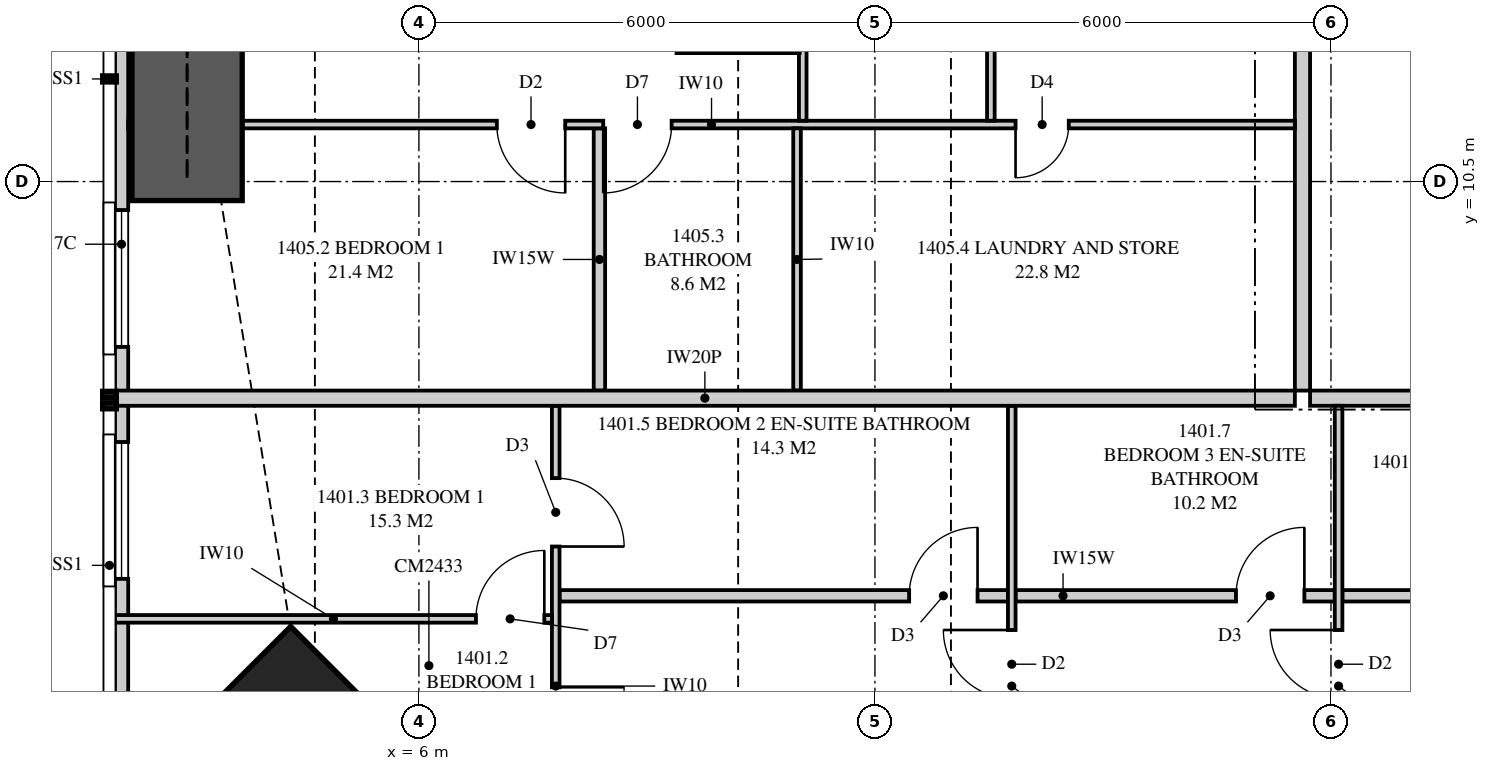
"""IFC4 building model, lengths in metres.
Left out: names, types, materials, properties, quantities, classifications, styles, units other than length and angle.
Written with IfcOpenShell. Run it as: python <this file> out.ifc"""

import sys

from ifc_helpers import new_model, si_unit, direction, frame, frame_2d, origin, origin_2d, place, context, subcontext, project, spatial, polyline, rectangle, outline, extrude, element, fill, save


model = new_model("IFC4")
c1 = context("Model", 3, precision=1e-05, world=origin(), true_north=direction((0.0, 1.0)))
c2 = subcontext(c1, "Body", "Model", "MODEL_VIEW")
j1 = project(units=[si_unit("LENGTHUNIT", "METRE"), si_unit("PLANEANGLEUNIT", "RADIAN")], contexts=[c1])
p1 = place(None, origin())
s1 = spatial("IfcSite", under=j1, at=p1, CompositionType="ELEMENT")
p2 = place(p1, origin())
s2 = spatial("IfcBuilding", under=s1, at=p2, CompositionType="ELEMENT")
p3 = place(p2, frame((0.0, 0.0, 54.5)))
s3 = spatial("IfcBuildingStorey", under=s2, at=p3, CompositionType="ELEMENT", Elevation=54.5)
p4 = place(p3, frame((4.631, 2.631, 0.0), z_axis=(0.0, 0.0, 1.0), x_axis=(0.707106781187, 0.707106781187, 0.0)))
e1 = element("IfcColumn", 1, at=p4, inside=s3, PredefinedType="COLUMN", context=c2, shape_type="SweptSolid", body=[
    extrude(rectangle(XDim=2.4, YDim=3.3, at=origin_2d()), origin(), (0.0, 0.0, 1.0), 3.35),
])
p5 = place(p3, frame((2.087, 16.3, 0.0), z_axis=(0.0, 0.0, 1.0), x_axis=(0.0, -1.0, 0.0)))
e2 = element("IfcWall", 2, at=p5, inside=s3, PredefinedType="SOLIDWALL", context=c2, shape_type="SweptSolid", body=[
    extrude(outline(polyline([(0.0, 0.0), (13.249, 0.0), (13.249, 3.11), (3.519, 3.11), (3.519, 2.15), (3.426, 2.15), (3.426, 3.11), (3.3, 3.11), (3.3, 2.15), (0.0, 2.15), (0.0, 0.0)])), frame((0.0, 0.087, 0.0), z_axis=(0.0, -1.0, 0.0), x_axis=(1.0, 0.0, 0.0)), (0.0, 0.0, 1.0), 0.175),
])
p6 = place(p5, frame((6.175, 0.0, 0.4)))
e3 = element("IfcOpeningElement", 3, at=p6, cuts=e2, PredefinedType="OPENING", context=c2, shape_type="SweptSolid", body=[
    extrude(rectangle(XDim=1.8, YDim=1.7, at=frame_2d((0.9, 0.85))), frame((0.0, 0.097, 0.0), z_axis=(0.0, -1.0, 0.0), x_axis=(1.0, 0.0, 0.0)), (0.0, 0.0, 1.0), 0.195),
])
p7 = place(p5, frame((9.227, 0.0, 0.4)))
e4 = element("IfcOpeningElement", 4, at=p7, cuts=e2, PredefinedType="OPENING", context=c2, shape_type="SweptSolid", body=[
    extrude(rectangle(XDim=1.8, YDim=1.7, at=frame_2d((0.9, 0.85))), frame((0.0, 0.097, 0.0), z_axis=(0.0, -1.0, 0.0), x_axis=(1.0, 0.0, 0.0)), (0.0, 0.0, 1.0), 0.195),
])
p8 = place(p3, frame((17.725, 7.65, 0.0), z_axis=(0.0, 0.0, 1.0), x_axis=(1.0, 0.0, 0.0)))
e5 = element("IfcWall", 5, at=p8, inside=s3, PredefinedType="PARTITIONING", context=c2, shape_type="SweptSolid", body=[
    extrude(rectangle(XDim=3.525, YDim=0.2, at=frame_2d((1.762, 0.0))), origin(), (0.0, 0.0, 1.0), 3.11),
])
p9 = place(p3, frame((7.8, 0.175, 0.0), z_axis=(0.0, 0.0, 1.0), x_axis=(0.0, 1.0, 0.0)))
e6 = element("IfcWall", 6, at=p9, inside=s3, PredefinedType="PARTITIONING", context=c2, shape_type="SweptSolid", body=[
    extrude(outline(polyline([(0.0, 0.0), (7.375, 0.0), (7.375, 3.11), (2.697, 3.11), (2.697, 2.15), (0.943, 2.15), (0.943, 3.11), (0.0, 3.11), (0.0, 0.0)])), frame((0.0, 0.05, 0.0), z_axis=(0.0, -1.0, 0.0), x_axis=(1.0, 0.0, 0.0)), (0.0, 0.0, 1.0), 0.1),
])
p10 = place(p9, frame((2.772, 0.0, 0.0)))
e7 = element("IfcOpeningElement", 7, at=p10, cuts=e6, PredefinedType="OPENING", context=c2, shape_type="SweptSolid", body=[
    extrude(rectangle(XDim=0.9, YDim=2.1, at=frame_2d((0.45, 1.05))), frame((0.0, 0.06, 0.0), z_axis=(0.0, -1.0, 0.0), x_axis=(1.0, 0.0, 0.0)), (0.0, 0.0, 1.0), 0.12),
])
p11 = place(p9, frame((5.523, 0.0, 0.0)))
e8 = element("IfcOpeningElement", 8, at=p11, cuts=e6, PredefinedType="OPENING", context=c2, shape_type="SweptSolid", body=[
    extrude(rectangle(XDim=0.9, YDim=2.1, at=frame_2d((0.45, 1.05))), frame((0.0, 0.06, 0.0), z_axis=(0.0, -1.0, 0.0), x_axis=(1.0, 0.0, 0.0)), (0.0, 0.0, 1.0), 0.12),
])
p12 = place(p3, frame((13.8, 0.175, 0.0), z_axis=(0.0, 0.0, 1.0), x_axis=(0.0, 1.0, 0.0)))
e9 = element("IfcWall", 9, at=p12, inside=s3, PredefinedType="PARTITIONING", context=c2, shape_type="SweptSolid", body=[
    extrude(outline(polyline([(1.635, 2.15), (0.0, 2.15), (0.0, 0.0), (7.375, 0.0), (7.375, 3.11), (1.635, 3.11), (1.635, 2.15)]), holes=[polyline([(1.021, 0.133), (0.529, 0.133), (0.529, 0.923), (1.021, 0.923), (1.021, 0.133)]), polyline([(1.021, 1.227), (0.529, 1.227), (0.529, 2.017), (1.021, 2.017), (1.021, 1.227)])]), frame((0.0, 0.05, 0.0), z_axis=(0.0, -1.0, 0.0), x_axis=(1.0, 0.0, 0.0)), (0.0, 0.0, 1.0), 0.1),
])
p13 = place(p12, frame((3.525, 0.0, 0.0)))
e10 = element("IfcOpeningElement", 10, at=p13, cuts=e9, PredefinedType="OPENING", context=c2, shape_type="SweptSolid", body=[
    extrude(rectangle(XDim=0.9, YDim=2.1, at=frame_2d((0.45, 1.05))), frame((0.0, 0.06, 0.0), z_axis=(0.0, -1.0, 0.0), x_axis=(1.0, 0.0, 0.0)), (0.0, 0.0, 1.0), 0.12),
])
p14 = place(p3, frame((18.1, 0.175, 0.0), z_axis=(0.0, 0.0, 1.0), x_axis=(0.0, 1.0, 0.0)))
e11 = element("IfcWall", 11, at=p14, inside=s3, PredefinedType="PARTITIONING", context=c2, shape_type="SweptSolid", body=[
    extrude(outline(polyline([(0.0, 0.0), (7.375, 0.0), (7.375, 3.11), (1.635, 3.11), (1.635, 2.15), (0.0, 2.15), (0.0, 3.11), (0.0, 0.0)])), frame((0.0, 0.05, 0.0), z_axis=(0.0, -1.0, 0.0), x_axis=(1.0, 0.0, 0.0)), (0.0, 0.0, 1.0), 0.1),
])
p15 = place(p14, frame((3.525, 0.0, 0.0)))
e12 = element("IfcOpeningElement", 12, at=p15, cuts=e11, PredefinedType="OPENING", context=c2, shape_type="SweptSolid", body=[
    extrude(rectangle(XDim=0.9, YDim=2.1, at=frame_2d((0.45, 1.05))), frame((0.0, 0.06, 0.0), z_axis=(0.0, -1.0, 0.0), x_axis=(1.0, 0.0, 0.0)), (0.0, 0.0, 1.0), 0.12),
])
p16 = place(p3, frame((2.0, 4.747, 0.0), z_axis=(0.0, 0.0, 1.0), x_axis=(1.0, 0.0, 0.0)))
e13 = element("IfcWall", 13, at=p16, inside=s3, PredefinedType="PARTITIONING", context=c2, shape_type="SweptSolid", body=[
    extrude(outline(polyline([(0.0, 0.0), (5.75, 0.0), (5.75, 3.11), (3.16, 3.11), (3.16, 2.15), (1.417, 2.15), (1.417, 3.11), (0.0, 3.11), (0.0, 0.0)])), frame((0.0, 0.05, 0.0), z_axis=(0.0, -1.0, 0.0), x_axis=(1.0, 0.0, 0.0)), (0.0, 0.0, 1.0), 0.1),
])
p17 = place(p16, frame((4.75, 0.0, 0.0)))
e14 = element("IfcOpeningElement", 14, at=p17, cuts=e13, PredefinedType="OPENING", context=c2, shape_type="SweptSolid", body=[
    extrude(rectangle(XDim=0.9, YDim=2.1, at=frame_2d((0.45, 1.05))), frame((0.0, 0.06, 0.0), z_axis=(0.0, -1.0, 0.0), x_axis=(1.0, 0.0, 0.0)), (0.0, 0.0, 1.0), 0.12),
])
p18 = place(p3, frame((7.85, 5.05, 0.0), z_axis=(0.0, 0.0, 1.0), x_axis=(1.0, 0.0, 0.0)))
e15 = element("IfcWall", 15, at=p18, inside=s3, PredefinedType="PLUMBINGWALL", context=c2, shape_type="SweptSolid", body=[
    extrude(outline(polyline([(0.0, 0.0), (5.9, 0.0), (5.9, 3.11), (5.462, 3.11), (5.462, 2.541), (4.838, 2.541), (4.838, 3.11), (3.635, 3.11), (3.635, 2.51), (1.065, 2.51), (1.065, 3.11), (0.0, 3.11), (0.0, 0.0)])), frame((0.0, 0.075, 0.0), z_axis=(0.0, -1.0, 0.0), x_axis=(1.0, 0.0, 0.0)), (0.0, 0.0, 1.0), 0.15),
])
p19 = place(p18, frame((4.6, 0.0, 0.0)))
e16 = element("IfcOpeningElement", 16, at=p19, cuts=e15, PredefinedType="OPENING", context=c2, shape_type="SweptSolid", body=[
    extrude(rectangle(XDim=0.9, YDim=2.1, at=frame_2d((0.45, 1.05))), frame((0.0, 0.085, 0.0), z_axis=(0.0, -1.0, 0.0), x_axis=(1.0, 0.0, 0.0)), (0.0, 0.0, 1.0), 0.17),
])
p20 = place(p3, frame((13.85, 5.05, 0.0), z_axis=(0.0, 0.0, 1.0), x_axis=(1.0, 0.0, 0.0)))
e17 = element("IfcWall", 17, at=p20, inside=s3, PredefinedType="PLUMBINGWALL", context=c2, shape_type="SweptSolid", body=[
    extrude(rectangle(XDim=4.2, YDim=0.15, at=frame_2d((2.1, 0.0))), origin(), (0.0, 0.0, 1.0), 3.11),
])
p21 = place(p20, frame((2.9, 0.0, 0.0)))
e18 = element("IfcOpeningElement", 18, at=p21, cuts=e17, PredefinedType="OPENING", context=c2, shape_type="SweptSolid", body=[
    extrude(rectangle(XDim=0.9, YDim=2.1, at=frame_2d((0.45, 1.05))), frame((0.0, 0.085, 0.0), z_axis=(0.0, -1.0, 0.0), x_axis=(1.0, 0.0, 0.0)), (0.0, 0.0, 1.0), 0.17),
])
p22 = place(p3, frame((18.15, 5.05, 0.0), z_axis=(0.0, 0.0, 1.0), x_axis=(1.0, 0.0, 0.0)))
e19 = element("IfcWall", 19, at=p22, inside=s3, PredefinedType="PLUMBINGWALL", context=c2, shape_type="SweptSolid", body=[
    extrude(rectangle(XDim=2.95, YDim=0.15, at=frame_2d((1.475, 0.0))), origin(), (0.0, 0.0, 1.0), 3.11),
])
p23 = place(p3, frame((2.0, 7.65, 0.0), z_axis=(0.0, 0.0, 1.0), x_axis=(1.0, 0.0, 0.0)))
e20 = element("IfcWall", 20, at=p23, inside=s3, PredefinedType="PARTITIONING", context=c2, shape_type="SweptSolid", body=[
    extrude(outline(polyline([(0.0, 0.0), (15.525, 0.0), (15.525, 3.11), (11.337, 3.11), (11.337, 2.541), (10.663, 2.541), (10.663, 3.11), (9.51, 3.11), (9.51, 2.51), (6.89, 2.51), (6.89, 3.11), (2.969, 3.11), (2.969, 2.541), (2.74, 2.541), (2.74, 2.15), (0.896, 2.15), (0.896, 3.11), (0.0, 3.11), (0.0, 0.0)])), frame((0.0, 0.1, 0.0), z_axis=(0.0, -1.0, 0.0), x_axis=(1.0, 0.0, 0.0)), (0.0, 0.0, 1.0), 0.2),
])
p24 = place(p3, frame((17.625, 7.75, 0.0), z_axis=(0.0, 0.0, 1.0), x_axis=(0.0, 1.0, 0.0)))
e21 = element("IfcWall", 21, at=p24, inside=s3, PredefinedType="PARTITIONING", context=c2, shape_type="SweptSolid", body=[
    extrude(outline(polyline([(0.0, 0.0), (16.25, 0.0), (16.25, 3.11), (5.587, 3.11), (5.587, 2.541), (4.913, 2.541), (4.913, 3.11), (0.0, 3.11), (0.0, 0.0)])), frame((0.0, 0.1, 0.0), z_axis=(0.0, -1.0, 0.0), x_axis=(1.0, 0.0, 0.0)), (0.0, 0.0, 1.0), 0.2),
])
p25 = place(p24, frame((7.075, 0.0, 0.0)))
e22 = element("IfcOpeningElement", 22, at=p25, cuts=e21, PredefinedType="OPENING", context=c2, shape_type="SweptSolid", body=[
    extrude(rectangle(XDim=1.05, YDim=2.2, at=frame_2d((0.525, 1.1))), frame((0.0, 0.11, 0.0), z_axis=(0.0, -1.0, 0.0), x_axis=(1.0, 0.0, 0.0)), (0.0, 0.0, 1.0), 0.22),
])
p26 = place(p3, frame((2.175, 11.25, 0.0), z_axis=(0.0, 0.0, 1.0), x_axis=(1.0, 0.0, 0.0)))
e23 = element("IfcWall", 23, at=p26, inside=s3, PredefinedType="PARTITIONING", context=c2, shape_type="SweptSolid", body=[
    extrude(outline(polyline([(0.188, 3.11), (0.0, 3.11), (0.0, 0.0), (0.529, 0.0), (0.529, 0.273), (1.021, 0.273), (1.021, 0.0), (15.35, 0.0), (15.35, 3.11), (11.112, 3.11), (11.112, 2.541), (10.538, 2.541), (10.538, 3.11), (9.285, 3.11), (9.285, 2.51), (6.765, 2.51), (6.765, 3.11), (2.744, 3.11), (2.744, 2.541), (2.169, 2.541), (2.169, 3.11), (1.93, 3.11), (1.93, 2.15), (1.021, 2.15), (1.021, 1.876), (0.529, 1.876), (0.529, 2.15), (0.188, 2.15), (0.188, 3.11)])), frame((0.0, 0.05, 0.0), z_axis=(0.0, -1.0, 0.0), x_axis=(1.0, 0.0, 0.0)), (0.0, 0.0, 1.0), 0.1),
])
p27 = place(p26, frame((4.85, 0.0, 0.0)))
e24 = element("IfcOpeningElement", 24, at=p27, cuts=e23, PredefinedType="OPENING", context=c2, shape_type="SweptSolid", body=[
    extrude(rectangle(XDim=0.9, YDim=2.1, at=frame_2d((0.45, 1.05))), frame((0.0, 0.06, 0.0), z_axis=(0.0, -1.0, 0.0), x_axis=(1.0, 0.0, 0.0)), (0.0, 0.0, 1.0), 0.12),
])
p28 = place(p26, frame((6.25, 0.0, 0.0)))
e25 = element("IfcOpeningElement", 25, at=p28, cuts=e23, PredefinedType="OPENING", context=c2, shape_type="SweptSolid", body=[
    extrude(rectangle(XDim=0.9, YDim=2.1, at=frame_2d((0.45, 1.05))), frame((0.0, 0.06, 0.0), z_axis=(0.0, -1.0, 0.0), x_axis=(1.0, 0.0, 0.0)), (0.0, 0.0, 1.0), 0.12),
])
p29 = place(p26, frame((11.675, 0.0, 0.0)))
e26 = element("IfcOpeningElement", 26, at=p29, cuts=e23, PredefinedType="OPENING", context=c2, shape_type="SweptSolid", body=[
    extrude(rectangle(XDim=0.7, YDim=2.1, at=frame_2d((0.35, 1.05))), frame((0.0, 0.06, 0.0), z_axis=(0.0, -1.0, 0.0), x_axis=(1.0, 0.0, 0.0)), (0.0, 0.0, 1.0), 0.12),
])
p30 = place(p3, frame((8.375, 7.75, 0.0), z_axis=(0.0, 0.0, 1.0), x_axis=(0.0, 1.0, 0.0)))
e27 = element("IfcWall", 27, at=p30, inside=s3, PredefinedType="PLUMBINGWALL", context=c2, shape_type="SweptSolid", body=[
    extrude(rectangle(XDim=3.45, YDim=0.15, at=frame_2d((1.725, 0.0))), origin(), (0.0, 0.0, 1.0), 3.11),
])
p31 = place(p3, frame((10.975, 7.75, 0.0), z_axis=(0.0, 0.0, 1.0), x_axis=(0.0, 1.0, 0.0)))
e28 = element("IfcWall", 28, at=p31, inside=s3, PredefinedType="PARTITIONING", context=c2, shape_type="SweptSolid", body=[
    extrude(outline(polyline([(0.0, 0.0), (3.45, 0.0), (3.45, 3.11), (3.45, 2.51), (0.0, 2.51), (0.0, 3.11), (0.0, 0.0)])), frame((0.0, 0.05, 0.0), z_axis=(0.0, -1.0, 0.0), x_axis=(1.0, 0.0, 0.0)), (0.0, 0.0, 1.0), 0.1),
])
p32 = place(p3, frame((13.525, 11.3, 0.0), z_axis=(0.0, 0.0, 1.0), x_axis=(0.0, 1.0, 0.0)))
e29 = element("IfcWall", 29, at=p32, inside=s3, PredefinedType="PARTITIONING", context=c2, shape_type="SweptSolid", body=[
    extrude(outline(polyline([(0.0, 0.0), (8.05, 0.0), (8.05, 3.11), (1.987, 3.11), (1.987, 2.541), (1.413, 2.541), (1.413, 3.11), (0.0, 3.11), (0.0, 0.0)])), frame((0.0, 0.05, 0.0), z_axis=(0.0, -1.0, 0.0), x_axis=(1.0, 0.0, 0.0)), (0.0, 0.0, 1.0), 0.1),
])
p33 = place(p32, frame((3.525, 0.0, 0.0)))
e30 = element("IfcOpeningElement", 30, at=p33, cuts=e29, PredefinedType="OPENING", context=c2, shape_type="SweptSolid", body=[
    extrude(rectangle(XDim=1.0, YDim=2.1, at=frame_2d((0.5, 1.05))), frame((0.0, 0.06, 0.0), z_axis=(0.0, -1.0, 0.0), x_axis=(1.0, 0.0, 0.0)), (0.0, 0.0, 1.0), 0.12),
])
p34 = place(p3, frame((11.05, 11.3, 0.0), z_axis=(0.0, 0.0, 1.0), x_axis=(0.0, 1.0, 0.0)))
e31 = element("IfcWall", 31, at=p34, inside=s3, PredefinedType="PARTITIONING", context=c2, shape_type="SweptSolid", body=[
    extrude(rectangle(XDim=8.05, YDim=0.1, at=frame_2d((4.025, 0.0))), origin(), (0.0, 0.0, 1.0), 2.51),
])
p35 = place(p34, frame((3.525, 0.0, 0.0)))
e32 = element("IfcOpeningElement", 32, at=p35, cuts=e31, PredefinedType="OPENING", context=c2, shape_type="SweptSolid", body=[
    extrude(rectangle(XDim=1.0, YDim=2.1, at=frame_2d((0.5, 1.05))), frame((0.0, 0.06, 0.0), z_axis=(0.0, -1.0, 0.0), x_axis=(1.0, 0.0, 0.0)), (0.0, 0.0, 1.0), 0.12),
])
p36 = place(p3, frame((2.95, 10.25, 0.0), z_axis=(0.0, 0.0, 1.0), x_axis=(0.0, 1.0, 0.0)))
e33 = element("IfcWall", 33, at=p36, inside=s3, PredefinedType="SHEAR", context=c2, shape_type="SweptSolid", body=[
    extrude(rectangle(XDim=5.5, YDim=1.45, at=frame_2d((2.75, 0.0))), origin(), (0.0, 0.0, 1.0), 3.35),
])
p37 = place(p6, origin())
e34 = element("IfcWindow", 34, at=p37, inside=s3, PartitioningType="SINGLE_PANEL", PredefinedType="WINDOW", context=c2, shape_type="SweptSolid", body=[
    extrude(rectangle(XDim=1.8, YDim=1.7, at=frame_2d((0.9, 0.85))), frame((0.0, 0.03, 0.0), z_axis=(0.0, -1.0, 0.0), x_axis=(1.0, 0.0, 0.0)), (0.0, 0.0, 1.0), 0.06),
])
fill(e3, e34)
p38 = place(p7, origin())
e35 = element("IfcWindow", 35, at=p38, inside=s3, PartitioningType="SINGLE_PANEL", PredefinedType="WINDOW", context=c2, shape_type="SweptSolid", body=[
    extrude(rectangle(XDim=1.8, YDim=1.7, at=frame_2d((0.9, 0.85))), frame((0.0, 0.03, 0.0), z_axis=(0.0, -1.0, 0.0), x_axis=(1.0, 0.0, 0.0)), (0.0, 0.0, 1.0), 0.06),
])
fill(e4, e35)
p39 = place(p17, origin())
e36 = element("IfcDoor", 36, at=p39, inside=s3, OperationType="SINGLE_SWING_RIGHT", PredefinedType="DOOR", context=c2, shape_type="SweptSolid", body=[
    extrude(rectangle(XDim=0.9, YDim=2.1, at=frame_2d((0.45, 1.05))), frame((0.0, 0.025, 0.0), z_axis=(0.0, -1.0, 0.0), x_axis=(1.0, 0.0, 0.0)), (0.0, 0.0, 1.0), 0.05),
])
fill(e14, e36)
p40 = place(p10, frame((0.9, 0.0, 0.0), z_axis=(0.0, 0.0, 1.0), x_axis=(-1.0, 0.0, 0.0)))
e37 = element("IfcDoor", 37, at=p40, inside=s3, OperationType="SINGLE_SWING_LEFT", PredefinedType="DOOR", context=c2, shape_type="SweptSolid", body=[
    extrude(rectangle(XDim=0.9, YDim=2.1, at=frame_2d((0.45, 1.05))), frame((0.0, 0.025, 0.0), z_axis=(0.0, -1.0, 0.0), x_axis=(1.0, 0.0, 0.0)), (0.0, 0.0, 1.0), 0.05),
])
fill(e7, e37)
p41 = place(p13, origin())
e38 = element("IfcDoor", 38, at=p41, inside=s3, OperationType="SINGLE_SWING_RIGHT", PredefinedType="DOOR", context=c2, shape_type="SweptSolid", body=[
    extrude(rectangle(XDim=0.9, YDim=2.1, at=frame_2d((0.45, 1.05))), frame((0.0, 0.025, 0.0), z_axis=(0.0, -1.0, 0.0), x_axis=(1.0, 0.0, 0.0)), (0.0, 0.0, 1.0), 0.05),
])
fill(e10, e38)
p42 = place(p19, origin())
e39 = element("IfcDoor", 39, at=p42, inside=s3, OperationType="SINGLE_SWING_RIGHT", PredefinedType="DOOR", context=c2, shape_type="SweptSolid", body=[
    extrude(rectangle(XDim=0.9, YDim=2.1, at=frame_2d((0.45, 1.05))), frame((0.0, 0.025, 0.0), z_axis=(0.0, -1.0, 0.0), x_axis=(1.0, 0.0, 0.0)), (0.0, 0.0, 1.0), 0.05),
])
fill(e16, e39)
p43 = place(p15, origin())
e40 = element("IfcDoor", 40, at=p43, inside=s3, OperationType="SINGLE_SWING_RIGHT", PredefinedType="DOOR", context=c2, shape_type="SweptSolid", body=[
    extrude(rectangle(XDim=0.9, YDim=2.1, at=frame_2d((0.45, 1.05))), frame((0.0, 0.025, 0.0), z_axis=(0.0, -1.0, 0.0), x_axis=(1.0, 0.0, 0.0)), (0.0, 0.0, 1.0), 0.05),
])
fill(e12, e40)
p44 = place(p21, origin())
e41 = element("IfcDoor", 41, at=p44, inside=s3, OperationType="SINGLE_SWING_RIGHT", PredefinedType="DOOR", context=c2, shape_type="SweptSolid", body=[
    extrude(rectangle(XDim=0.9, YDim=2.1, at=frame_2d((0.45, 1.05))), frame((0.0, 0.025, 0.0), z_axis=(0.0, -1.0, 0.0), x_axis=(1.0, 0.0, 0.0)), (0.0, 0.0, 1.0), 0.05),
])
fill(e18, e41)
p45 = place(p11, frame((0.9, 0.0, 0.0), z_axis=(0.0, 0.0, 1.0), x_axis=(-1.0, 0.0, 0.0)))
e42 = element("IfcDoor", 42, at=p45, inside=s3, OperationType="SINGLE_SWING_RIGHT", PredefinedType="DOOR", context=c2, shape_type="SweptSolid", body=[
    extrude(rectangle(XDim=0.9, YDim=2.1, at=frame_2d((0.45, 1.05))), frame((0.0, 0.025, 0.0), z_axis=(0.0, -1.0, 0.0), x_axis=(1.0, 0.0, 0.0)), (0.0, 0.0, 1.0), 0.05),
])
fill(e8, e42)
p46 = place(p27, frame((0.9, 0.0, 0.0), z_axis=(0.0, 0.0, 1.0), x_axis=(-1.0, 0.0, 0.0)))
e43 = element("IfcDoor", 43, at=p46, inside=s3, OperationType="SINGLE_SWING_LEFT", PredefinedType="DOOR", context=c2, shape_type="SweptSolid", body=[
    extrude(rectangle(XDim=0.9, YDim=2.1, at=frame_2d((0.45, 1.05))), frame((0.0, 0.025, 0.0), z_axis=(0.0, -1.0, 0.0), x_axis=(1.0, 0.0, 0.0)), (0.0, 0.0, 1.0), 0.05),
])
fill(e24, e43)
p47 = place(p28, frame((0.9, 0.0, 0.0), z_axis=(0.0, 0.0, 1.0), x_axis=(-1.0, 0.0, 0.0)))
e44 = element("IfcDoor", 44, at=p47, inside=s3, OperationType="SINGLE_SWING_RIGHT", PredefinedType="DOOR", context=c2, shape_type="SweptSolid", body=[
    extrude(rectangle(XDim=0.9, YDim=2.1, at=frame_2d((0.45, 1.05))), frame((0.0, 0.025, 0.0), z_axis=(0.0, -1.0, 0.0), x_axis=(1.0, 0.0, 0.0)), (0.0, 0.0, 1.0), 0.05),
])
fill(e25, e44)
p48 = place(p29, frame((0.7, 0.0, 0.0), z_axis=(0.0, 0.0, 1.0), x_axis=(-1.0, 0.0, 0.0)))
e45 = element("IfcDoor", 45, at=p48, inside=s3, OperationType="SINGLE_SWING_RIGHT", PredefinedType="DOOR", context=c2, shape_type="SweptSolid", body=[
    extrude(rectangle(XDim=0.7, YDim=2.1, at=frame_2d((0.35, 1.05))), frame((0.0, 0.025, 0.0), z_axis=(0.0, -1.0, 0.0), x_axis=(1.0, 0.0, 0.0)), (0.0, 0.0, 1.0), 0.05),
])
fill(e26, e45)
save(model, sys.argv[1])
